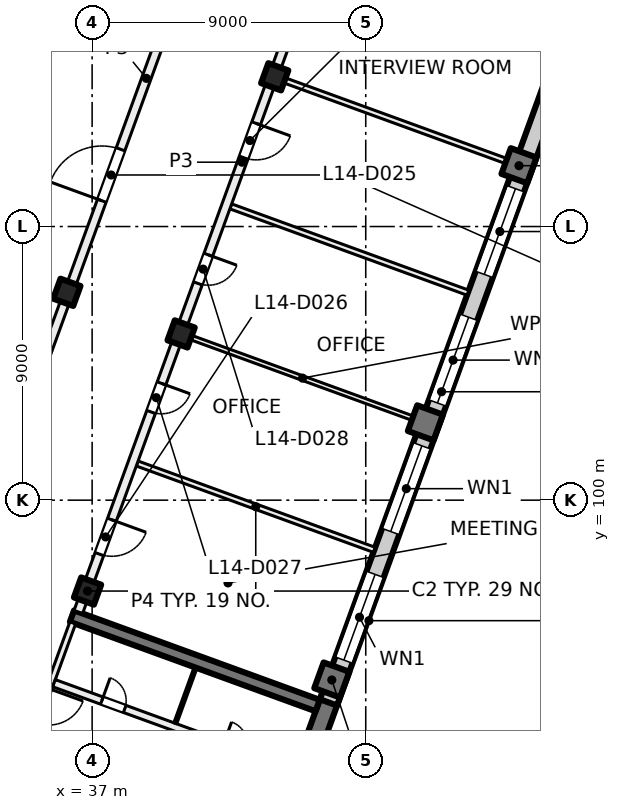
"""IFC4 building model, lengths in metres.
Left out: names, types, materials, properties, quantities, classifications, styles, units other than length and angle.
Written with IfcOpenShell. Run it as: python <this file> out.ifc"""

import sys

from ifc_helpers import new_model, si_unit, direction, frame, frame_2d, origin, origin_2d, place, context, subcontext, project, spatial, rectangle, extrude, element, fill, save


model = new_model("IFC4")
c1 = context("Model", 3, precision=1e-05, world=origin(), true_north=direction((0.0, 1.0)))
c2 = subcontext(c1, "Body", "Model", "MODEL_VIEW")
j1 = project(units=[si_unit("LENGTHUNIT", "METRE"), si_unit("PLANEANGLEUNIT", "RADIAN")], contexts=[c1])
p1 = place(None, origin())
s1 = spatial("IfcSite", under=j1, at=p1, CompositionType="ELEMENT")
p2 = place(p1, origin())
s2 = spatial("IfcBuilding", under=s1, at=p2, CompositionType="ELEMENT")
p3 = place(p2, frame((0.0, 0.0, 63.5)))
s3 = spatial("IfcBuildingStorey", under=s2, at=p3, CompositionType="ELEMENT", Elevation=63.5)
for number, where, z_axis, x_axis in (
    (1, (43.006, 113.925, 0.0), (0.0, 0.0, 1.0), (-0.342, -0.94, 0.0)),
    (2, (39.927, 105.468, 0.0), (0.0, 0.0, 1.0), (-0.342, -0.94, 0.0)),
    (3, (36.849, 97.011, 0.0), (0.0, 0.0, 1.0), (-0.342, -0.94, 0.0)),
    (4, (36.169, 106.836, 0.0), (0.0, 0.0, 1.0), (-0.342, -0.94, 0.0)),
):
    element("IfcColumn", number, at=place(p3, frame(where, z_axis=z_axis, x_axis=x_axis)), inside=s3, PredefinedType="COLUMN", context=c2, shape_type="SweptSolid", body=[
        extrude(rectangle(XDim=0.7, YDim=0.7, at=origin_2d()), origin(), (0.0, 0.0, 1.0), 4.0),
    ])
for number, where, z_axis, x_axis in (
    (5, (51.04, 111.001, 0.0), (0.0, 0.0, 1.0), (-0.342, -0.94, 0.0)),
    (6, (47.962, 102.544, 0.0), (0.0, 0.0, 1.0), (-0.342, -0.94, 0.0)),
    (7, (44.884, 94.087, 0.0), (0.0, 0.0, 1.0), (-0.342, -0.94, 0.0)),
):
    element("IfcColumn", number, at=place(p3, frame(where, z_axis=z_axis, x_axis=x_axis)), inside=s3, PredefinedType="COLUMN", context=c2, shape_type="SweptSolid", body=[
        extrude(rectangle(XDim=0.9, YDim=0.9, at=origin_2d()), origin(), (0.0, 0.0, 1.0), 4.0),
    ])
p4 = place(p3, frame((41.827, 85.249, 0.0), z_axis=(0.0, 0.0, 1.0), x_axis=(0.342016162452, 0.939694069696, 0.0)))
e8 = element("IfcWall", 8, at=p4, inside=s3, PredefinedType="SHEAR", context=c2, shape_type="SweptSolid", body=[
    extrude(rectangle(XDim=8.9, YDim=0.6, at=frame_2d((4.45, 0.0))), origin(), (0.0, 0.0, 1.0), 4.0),
])
p5 = place(p3, frame((44.418, 93.245, 0.0), z_axis=(0.0, 0.0, 1.0), x_axis=(-0.93969060187, 0.342025690201, 0.0)))
e9 = element("IfcWall", 9, at=p5, inside=s3, PredefinedType="SHEAR", context=c2, shape_type="SweptSolid", body=[
    extrude(rectangle(XDim=8.6, YDim=0.4, at=frame_2d((4.3, 0.0))), origin(), (0.0, 0.0, 1.0), 4.0),
])
p6 = place(p3, frame((52.212, 113.783, 0.0), z_axis=(0.0, 0.0, 1.0), x_axis=(-0.34202521188, -0.939690775968, 0.0)))
e10 = element("IfcWall", 10, at=p6, inside=s3, PredefinedType="SOLIDWALL", context=c2, shape_type="SweptSolid", body=[
    extrude(rectangle(XDim=21.745, YDim=0.6, at=frame_2d((10.873, 0.0))), origin(), (0.0, 0.0, 1.0), 3.625),
])
p7 = place(p6, frame((3.765, 0.0, 0.9)))
e11 = element("IfcOpeningElement", 11, at=p7, cuts=e10, PredefinedType="OPENING", context=c2, shape_type="SweptSolid", body=[
    extrude(rectangle(XDim=3.0, YDim=2.4, at=frame_2d((1.5, 1.2))), frame((0.0, 0.31, 0.0), z_axis=(0.0, -1.0, 0.0), x_axis=(1.0, 0.0, 0.0)), (0.0, 0.0, 1.0), 0.62),
])
p8 = place(p6, frame((8.265, 0.0, 0.9)))
e12 = element("IfcOpeningElement", 12, at=p8, cuts=e10, PredefinedType="OPENING", context=c2, shape_type="SweptSolid", body=[
    extrude(rectangle(XDim=3.0, YDim=2.4, at=frame_2d((1.5, 1.2))), frame((0.0, 0.31, 0.0), z_axis=(0.0, -1.0, 0.0), x_axis=(1.0, 0.0, 0.0)), (0.0, 0.0, 1.0), 0.62),
])
p9 = place(p6, frame((12.765, 0.0, 0.9)))
e13 = element("IfcOpeningElement", 13, at=p9, cuts=e10, PredefinedType="OPENING", context=c2, shape_type="SweptSolid", body=[
    extrude(rectangle(XDim=3.0, YDim=2.4, at=frame_2d((1.5, 1.2))), frame((0.0, 0.31, 0.0), z_axis=(0.0, -1.0, 0.0), x_axis=(1.0, 0.0, 0.0)), (0.0, 0.0, 1.0), 0.62),
])
p10 = place(p6, frame((17.265, 0.0, 0.9)))
e14 = element("IfcOpeningElement", 14, at=p10, cuts=e10, PredefinedType="OPENING", context=c2, shape_type="SweptSolid", body=[
    extrude(rectangle(XDim=3.0, YDim=2.4, at=frame_2d((1.5, 1.2))), frame((0.0, 0.31, 0.0), z_axis=(0.0, -1.0, 0.0), x_axis=(1.0, 0.0, 0.0)), (0.0, 0.0, 1.0), 0.62),
])
p11 = place(p3, frame((24.666, 100.669, 0.0), z_axis=(0.0, 0.0, 1.0), x_axis=(0.34201964167, 0.939692803373, 0.0)))
e15 = element("IfcWall", 15, at=p11, inside=s3, PredefinedType="SOLIDWALL", context=c2, shape_type="SweptSolid", body=[
    extrude(rectangle(XDim=32.884, YDim=0.6, at=frame_2d((16.442, 0.0))), origin(), (0.0, 0.0, 1.0), 3.625),
])
p12 = place(p11, frame((1.48, 0.0, 0.9)))
e16 = element("IfcOpeningElement", 16, at=p12, cuts=e15, PredefinedType="OPENING", context=c2, shape_type="SweptSolid", body=[
    extrude(rectangle(XDim=3.0, YDim=2.4, at=frame_2d((1.5, 1.2))), frame((0.0, 0.31, 0.0), z_axis=(0.0, -1.0, 0.0), x_axis=(1.0, 0.0, 0.0)), (0.0, 0.0, 1.0), 0.62),
])
p13 = place(p11, frame((5.98, 0.0, 0.9)))
e17 = element("IfcOpeningElement", 17, at=p13, cuts=e15, PredefinedType="OPENING", context=c2, shape_type="SweptSolid", body=[
    extrude(rectangle(XDim=3.0, YDim=2.4, at=frame_2d((1.5, 1.2))), frame((0.0, 0.31, 0.0), z_axis=(0.0, -1.0, 0.0), x_axis=(1.0, 0.0, 0.0)), (0.0, 0.0, 1.0), 0.62),
])
p14 = place(p11, frame((10.48, 0.0, 0.9)))
e18 = element("IfcOpeningElement", 18, at=p14, cuts=e15, PredefinedType="OPENING", context=c2, shape_type="SweptSolid", body=[
    extrude(rectangle(XDim=3.0, YDim=2.4, at=frame_2d((1.5, 1.2))), frame((0.0, 0.31, 0.0), z_axis=(0.0, -1.0, 0.0), x_axis=(1.0, 0.0, 0.0)), (0.0, 0.0, 1.0), 0.62),
])
p15 = place(p11, frame((14.98, 0.0, 0.9)))
e19 = element("IfcOpeningElement", 19, at=p15, cuts=e15, PredefinedType="OPENING", context=c2, shape_type="SweptSolid", body=[
    extrude(rectangle(XDim=3.0, YDim=2.4, at=frame_2d((1.5, 1.2))), frame((0.0, 0.31, 0.0), z_axis=(0.0, -1.0, 0.0), x_axis=(1.0, 0.0, 0.0)), (0.0, 0.0, 1.0), 0.62),
])
p16 = place(p11, frame((19.48, 0.0, 0.9)))
e20 = element("IfcOpeningElement", 20, at=p16, cuts=e15, PredefinedType="OPENING", context=c2, shape_type="SweptSolid", body=[
    extrude(rectangle(XDim=3.0, YDim=2.4, at=frame_2d((1.5, 1.2))), frame((0.0, 0.31, 0.0), z_axis=(0.0, -1.0, 0.0), x_axis=(1.0, 0.0, 0.0)), (0.0, 0.0, 1.0), 0.62),
])
p17 = place(p11, frame((23.98, 0.0, 0.9)))
e21 = element("IfcOpeningElement", 21, at=p17, cuts=e15, PredefinedType="OPENING", context=c2, shape_type="SweptSolid", body=[
    extrude(rectangle(XDim=3.0, YDim=2.4, at=frame_2d((1.5, 1.2))), frame((0.0, 0.31, 0.0), z_axis=(0.0, -1.0, 0.0), x_axis=(1.0, 0.0, 0.0)), (0.0, 0.0, 1.0), 0.62),
])
p18 = place(p11, frame((28.48, 0.0, 0.9)))
e22 = element("IfcOpeningElement", 22, at=p18, cuts=e15, PredefinedType="OPENING", context=c2, shape_type="SweptSolid", body=[
    extrude(rectangle(XDim=3.0, YDim=2.4, at=frame_2d((1.5, 1.2))), frame((0.0, 0.31, 0.0), z_axis=(0.0, -1.0, 0.0), x_axis=(1.0, 0.0, 0.0)), (0.0, 0.0, 1.0), 0.62),
])
p19 = place(p3, frame((36.362, 95.964, 0.0), z_axis=(0.0, 0.0, 1.0), x_axis=(-0.341995824804, -0.939701471648, 0.0)))
e23 = element("IfcWall", 23, at=p19, inside=s3, PredefinedType="PARTITIONING", context=c2, shape_type="SweptSolid", body=[
    extrude(rectangle(XDim=3.8, YDim=0.2, at=frame_2d((1.9, 0.0))), origin(), (0.0, 0.0, 1.0), 3.625),
])
p20 = place(p19, frame((2.3, 0.0, 0.0)))
e24 = element("IfcOpeningElement", 24, at=p20, cuts=e23, PredefinedType="OPENING", context=c2, shape_type="SweptSolid", body=[
    extrude(rectangle(XDim=1.2, YDim=2.1, at=frame_2d((0.6, 1.05))), frame((0.0, 0.11, 0.0), z_axis=(0.0, -1.0, 0.0), x_axis=(1.0, 0.0, 0.0)), (0.0, 0.0, 1.0), 0.22),
])
p21 = place(p3, frame((35.19, 92.453, 0.0), z_axis=(0.0, 0.0, 1.0), x_axis=(0.939691552312, -0.342023078919, 0.0)))
e25 = element("IfcWall", 25, at=p21, inside=s3, PredefinedType="PARTITIONING", context=c2, shape_type="SweptSolid", body=[
    extrude(rectangle(XDim=8.4, YDim=0.2, at=frame_2d((4.2, 0.0))), origin(), (0.0, 0.0, 1.0), 3.625),
])
p22 = place(p21, frame((5.25, 0.0, 0.0)))
e26 = element("IfcOpeningElement", 26, at=p22, cuts=e25, PredefinedType="OPENING", context=c2, shape_type="SweptSolid", body=[
    extrude(rectangle(XDim=1.5, YDim=2.1, at=frame_2d((0.75, 1.05))), frame((0.0, 0.11, 0.0), z_axis=(0.0, -1.0, 0.0), x_axis=(1.0, 0.0, 0.0)), (0.0, 0.0, 1.0), 0.22),
])
p23 = place(p3, frame((35.746, 93.98, 0.0), z_axis=(0.0, 0.0, 1.0), x_axis=(0.939691552312, -0.342023078919, 0.0)))
e27 = element("IfcWall", 27, at=p23, inside=s3, PredefinedType="PARTITIONING", context=c2, shape_type="SweptSolid", body=[
    extrude(rectangle(XDim=8.4, YDim=0.25, at=frame_2d((4.2, 0.0))), origin(), (0.0, 0.0, 1.0), 3.625),
])
p24 = place(p23, frame((1.675, 0.0, 0.0)))
e28 = element("IfcOpeningElement", 28, at=p24, cuts=e27, PredefinedType="OPENING", context=c2, shape_type="SweptSolid", body=[
    extrude(rectangle(XDim=0.8, YDim=2.1, at=frame_2d((0.4, 1.05))), frame((0.0, 0.135, 0.0), z_axis=(0.0, -1.0, 0.0), x_axis=(1.0, 0.0, 0.0)), (0.0, 0.0, 1.0), 0.27),
])
p25 = place(p23, frame((5.925, 0.0, 0.0)))
e29 = element("IfcOpeningElement", 29, at=p25, cuts=e27, PredefinedType="OPENING", context=c2, shape_type="SweptSolid", body=[
    extrude(rectangle(XDim=0.8, YDim=2.1, at=frame_2d((0.4, 1.05))), frame((0.0, 0.135, 0.0), z_axis=(0.0, -1.0, 0.0), x_axis=(1.0, 0.0, 0.0)), (0.0, 0.0, 1.0), 0.27),
])
p26 = place(p3, frame((40.403, 94.494, 0.0), z_axis=(0.0, 0.0, 1.0), x_axis=(-0.342064742067, -0.939676386973, 0.0)))
e30 = element("IfcWall", 30, at=p26, inside=s3, PredefinedType="PARTITIONING", context=c2, shape_type="SweptSolid", body=[
    extrude(rectangle(XDim=1.95, YDim=0.1, at=frame_2d((0.975, 0.0))), origin(), (0.0, 0.0, 1.0), 3.625),
])
p27 = place(p3, frame((32.881, 97.657, 0.0), z_axis=(0.0, 0.0, 1.0), x_axis=(0.342017360004, 0.939693633828, 0.0)))
e31 = element("IfcWall", 31, at=p27, inside=s3, PredefinedType="PARTITIONING", context=c2, shape_type="SweptSolid", body=[
    extrude(rectangle(XDim=34.516, YDim=0.3, at=frame_2d((17.258, 0.0))), origin(), (0.0, 0.0, 1.0), 3.625),
])
p28 = place(p27, frame((12.975, 0.0, 0.0)))
e32 = element("IfcOpeningElement", 32, at=p28, cuts=e31, PredefinedType="OPENING", context=c2, shape_type="SweptSolid", body=[
    extrude(rectangle(XDim=1.8, YDim=2.1, at=frame_2d((0.9, 1.05))), frame((0.0, 0.16, 0.0), z_axis=(0.0, -1.0, 0.0), x_axis=(1.0, 0.0, 0.0)), (0.0, 0.0, 1.0), 0.32),
])
p29 = place(p3, frame((38.482, 101.206, 0.0), z_axis=(0.0, 0.0, 1.0), x_axis=(0.939687752599, -0.342033518263, 0.0)))
e33 = element("IfcWall", 33, at=p29, inside=s3, PredefinedType="PARTITIONING", context=c2, shape_type="SweptSolid", body=[
    extrude(rectangle(XDim=8.301, YDim=0.175, at=frame_2d((4.15, 0.0))), origin(), (0.0, 0.0, 1.0), 3.625),
])
p30 = place(p3, frame((40.021, 105.434, 0.0), z_axis=(0.0, 0.0, 1.0), x_axis=(0.939687752599, -0.342033518263, 0.0)))
e34 = element("IfcWall", 34, at=p30, inside=s3, PredefinedType="PARTITIONING", context=c2, shape_type="SweptSolid", body=[
    extrude(rectangle(XDim=8.301, YDim=0.15, at=frame_2d((4.15, 0.0))), origin(), (0.0, 0.0, 1.0), 3.625),
])
p31 = place(p3, frame((41.561, 109.663, 0.0), z_axis=(0.0, 0.0, 1.0), x_axis=(0.939673986983, -0.342071334939, 0.0)))
e35 = element("IfcWall", 35, at=p31, inside=s3, PredefinedType="PARTITIONING", context=c2, shape_type="SweptSolid", body=[
    extrude(rectangle(XDim=8.3, YDim=0.175, at=frame_2d((4.15, 0.0))), origin(), (0.0, 0.0, 1.0), 3.625),
])
p32 = place(p3, frame((43.1, 113.891, 0.0), z_axis=(0.0, 0.0, 1.0), x_axis=(0.939670544866, -0.342080790328, 0.0)))
e36 = element("IfcWall", 36, at=p32, inside=s3, PredefinedType="PARTITIONING", context=c2, shape_type="SweptSolid", body=[
    extrude(rectangle(XDim=8.3, YDim=0.175, at=frame_2d((4.15, 0.0))), origin(), (0.0, 0.0, 1.0), 3.625),
])
p33 = place(p3, frame((47.314, 125.909, 0.0), z_axis=(0.0, 0.0, 1.0), x_axis=(-0.342010770371, -0.939696032209, 0.0)))
e37 = element("IfcWall", 37, at=p33, inside=s3, PredefinedType="PARTITIONING", context=c2, shape_type="SweptSolid", body=[
    extrude(rectangle(XDim=31.485, YDim=0.3, at=frame_2d((15.742, 0.0))), origin(), (0.0, 0.0, 1.0), 3.625),
])
p34 = place(p33, frame((28.259, 0.0, 0.0)))
e38 = element("IfcOpeningElement", 38, at=p34, cuts=e37, PredefinedType="OPENING", context=c2, shape_type="SweptSolid", body=[
    extrude(rectangle(XDim=1.2, YDim=2.1, at=frame_2d((0.6, 1.05))), frame((0.0, 0.16, 0.0), z_axis=(0.0, -1.0, 0.0), x_axis=(1.0, 0.0, 0.0)), (0.0, 0.0, 1.0), 0.32),
])
p35 = place(p33, frame((23.484, 0.0, 0.0)))
e39 = element("IfcOpeningElement", 39, at=p35, cuts=e37, PredefinedType="OPENING", context=c2, shape_type="SweptSolid", body=[
    extrude(rectangle(XDim=1.0, YDim=2.1, at=frame_2d((0.5, 1.05))), frame((0.0, 0.16, 0.0), z_axis=(0.0, -1.0, 0.0), x_axis=(1.0, 0.0, 0.0)), (0.0, 0.0, 1.0), 0.32),
])
p36 = place(p33, frame((18.984, 0.0, 0.0)))
e40 = element("IfcOpeningElement", 40, at=p36, cuts=e37, PredefinedType="OPENING", context=c2, shape_type="SweptSolid", body=[
    extrude(rectangle(XDim=1.0, YDim=2.1, at=frame_2d((0.5, 1.05))), frame((0.0, 0.16, 0.0), z_axis=(0.0, -1.0, 0.0), x_axis=(1.0, 0.0, 0.0)), (0.0, 0.0, 1.0), 0.32),
])
p37 = place(p33, frame((14.385, 0.0, 0.0)))
e41 = element("IfcOpeningElement", 41, at=p37, cuts=e37, PredefinedType="OPENING", context=c2, shape_type="SweptSolid", body=[
    extrude(rectangle(XDim=1.2, YDim=2.1, at=frame_2d((0.6, 1.05))), frame((0.0, 0.16, 0.0), z_axis=(0.0, -1.0, 0.0), x_axis=(1.0, 0.0, 0.0)), (0.0, 0.0, 1.0), 0.32),
])
p38 = place(p33, frame((9.885, 0.0, 0.0)))
e42 = element("IfcOpeningElement", 42, at=p38, cuts=e37, PredefinedType="OPENING", context=c2, shape_type="SweptSolid", body=[
    extrude(rectangle(XDim=1.2, YDim=2.1, at=frame_2d((0.6, 1.05))), frame((0.0, 0.16, 0.0), z_axis=(0.0, -1.0, 0.0), x_axis=(1.0, 0.0, 0.0)), (0.0, 0.0, 1.0), 0.32),
])
p39 = place(p33, frame((5.384, 0.0, 0.0)))
e43 = element("IfcOpeningElement", 43, at=p39, cuts=e37, PredefinedType="OPENING", context=c2, shape_type="SweptSolid", body=[
    extrude(rectangle(XDim=1.2, YDim=2.1, at=frame_2d((0.6, 1.05))), frame((0.0, 0.16, 0.0), z_axis=(0.0, -1.0, 0.0), x_axis=(1.0, 0.0, 0.0)), (0.0, 0.0, 1.0), 0.32),
])
p40 = place(p7, origin())
e44 = element("IfcWindow", 44, at=p40, inside=s3, PartitioningType="SINGLE_PANEL", PredefinedType="WINDOW", context=c2, shape_type="SweptSolid", body=[
    extrude(rectangle(XDim=3.0, YDim=2.4, at=frame_2d((1.5, 1.2))), frame((0.0, 0.03, 0.0), z_axis=(0.0, -1.0, 0.0), x_axis=(1.0, 0.0, 0.0)), (0.0, 0.0, 1.0), 0.06),
])
fill(e11, e44)
p41 = place(p8, origin())
e45 = element("IfcWindow", 45, at=p41, inside=s3, PartitioningType="SINGLE_PANEL", PredefinedType="WINDOW", context=c2, shape_type="SweptSolid", body=[
    extrude(rectangle(XDim=3.0, YDim=2.4, at=frame_2d((1.5, 1.2))), frame((0.0, 0.03, 0.0), z_axis=(0.0, -1.0, 0.0), x_axis=(1.0, 0.0, 0.0)), (0.0, 0.0, 1.0), 0.06),
])
fill(e12, e45)
p42 = place(p9, origin())
e46 = element("IfcWindow", 46, at=p42, inside=s3, PartitioningType="SINGLE_PANEL", PredefinedType="WINDOW", context=c2, shape_type="SweptSolid", body=[
    extrude(rectangle(XDim=3.0, YDim=2.4, at=frame_2d((1.5, 1.2))), frame((0.0, 0.03, 0.0), z_axis=(0.0, -1.0, 0.0), x_axis=(1.0, 0.0, 0.0)), (0.0, 0.0, 1.0), 0.06),
])
fill(e13, e46)
p43 = place(p10, origin())
e47 = element("IfcWindow", 47, at=p43, inside=s3, PartitioningType="SINGLE_PANEL", PredefinedType="WINDOW", context=c2, shape_type="SweptSolid", body=[
    extrude(rectangle(XDim=3.0, YDim=2.4, at=frame_2d((1.5, 1.2))), frame((0.0, 0.03, 0.0), z_axis=(0.0, -1.0, 0.0), x_axis=(1.0, 0.0, 0.0)), (0.0, 0.0, 1.0), 0.06),
])
fill(e14, e47)
p44 = place(p24, origin())
e48 = element("IfcDoor", 48, at=p44, inside=s3, OperationType="SINGLE_SWING_RIGHT", PredefinedType="DOOR", context=c2, shape_type="SweptSolid", body=[
    extrude(rectangle(XDim=0.8, YDim=2.1, at=frame_2d((0.4, 1.05))), frame((0.0, 0.025, 0.0), z_axis=(0.0, -1.0, 0.0), x_axis=(1.0, 0.0, 0.0)), (0.0, 0.0, 1.0), 0.05),
])
fill(e28, e48)
p45 = place(p28, origin())
e49 = element("IfcDoor", 49, at=p45, inside=s3, OperationType="DOUBLE_DOOR_SINGLE_SWING", PredefinedType="DOOR", context=c2, shape_type="SweptSolid", body=[
    extrude(rectangle(XDim=1.8, YDim=2.1, at=frame_2d((0.9, 1.05))), frame((0.0, 0.025, 0.0), z_axis=(0.0, -1.0, 0.0), x_axis=(1.0, 0.0, 0.0)), (0.0, 0.0, 1.0), 0.05),
])
fill(e32, e49)
p46 = place(p34, origin())
e50 = element("IfcDoor", 50, at=p46, inside=s3, OperationType="DOUBLE_DOOR_SINGLE_SWING", PredefinedType="DOOR", context=c2, shape_type="SweptSolid", body=[
    extrude(rectangle(XDim=1.2, YDim=2.1, at=frame_2d((0.6, 1.05))), frame((0.0, 0.025, 0.0), z_axis=(0.0, -1.0, 0.0), x_axis=(1.0, 0.0, 0.0)), (0.0, 0.0, 1.0), 0.05),
])
fill(e38, e50)
p47 = place(p35, origin())
e51 = element("IfcDoor", 51, at=p47, inside=s3, OperationType="SINGLE_SWING_LEFT", PredefinedType="DOOR", context=c2, shape_type="SweptSolid", body=[
    extrude(rectangle(XDim=1.0, YDim=2.1, at=frame_2d((0.5, 1.05))), frame((0.0, 0.025, 0.0), z_axis=(0.0, -1.0, 0.0), x_axis=(1.0, 0.0, 0.0)), (0.0, 0.0, 1.0), 0.05),
])
fill(e39, e51)
p48 = place(p36, origin())
e52 = element("IfcDoor", 52, at=p48, inside=s3, OperationType="SINGLE_SWING_LEFT", PredefinedType="DOOR", context=c2, shape_type="SweptSolid", body=[
    extrude(rectangle(XDim=1.0, YDim=2.1, at=frame_2d((0.5, 1.05))), frame((0.0, 0.025, 0.0), z_axis=(0.0, -1.0, 0.0), x_axis=(1.0, 0.0, 0.0)), (0.0, 0.0, 1.0), 0.05),
])
fill(e40, e52)
p49 = place(p37, origin())
e53 = element("IfcDoor", 53, at=p49, inside=s3, OperationType="DOUBLE_DOOR_SINGLE_SWING", PredefinedType="DOOR", context=c2, shape_type="SweptSolid", body=[
    extrude(rectangle(XDim=1.2, YDim=2.1, at=frame_2d((0.6, 1.05))), frame((0.0, 0.025, 0.0), z_axis=(0.0, -1.0, 0.0), x_axis=(1.0, 0.0, 0.0)), (0.0, 0.0, 1.0), 0.05),
])
fill(e41, e53)
save(model, sys.argv[1])
